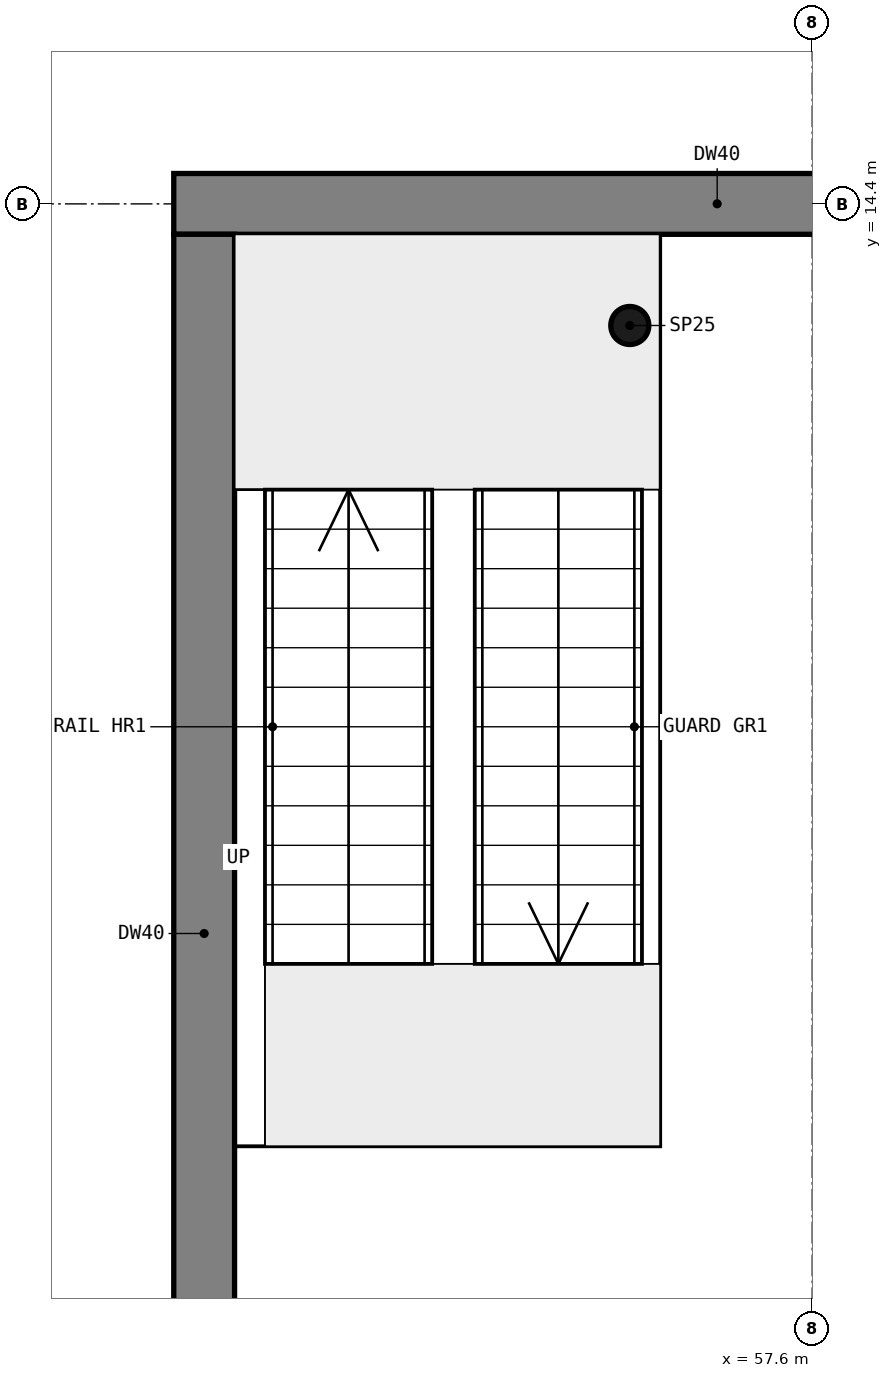
"""IFC4 building model, lengths in metres.
Left out: names, types, materials, properties, quantities, classifications, styles, units other than length and angle.
Written with IfcOpenShell. Run it as: python <this file> out.ifc"""

import sys

from ifc_helpers import new_model, si_unit, direction, frame, frame_2d, origin, origin_2d, place, context, subcontext, project, spatial, rectangle, circle, extrude, element, save


model = new_model("IFC4")
c1 = context("Model", 3, precision=1e-05, world=origin(), true_north=direction((0.0, 1.0)))
c2 = subcontext(c1, "Body", "Model", "MODEL_VIEW")
j1 = project(units=[si_unit("LENGTHUNIT", "METRE"), si_unit("PLANEANGLEUNIT", "RADIAN")], contexts=[c1])
p1 = place(None, origin())
s1 = spatial("IfcSite", under=j1, at=p1, CompositionType="ELEMENT")
p2 = place(p1, origin())
s2 = spatial("IfcBuilding", under=s1, at=p2, CompositionType="ELEMENT")
p3 = place(p2, frame((0.0, 0.0, 8.4)))
s3 = spatial("IfcBuildingStorey", under=s2, at=p3, CompositionType="ELEMENT", Elevation=8.4)
p4 = place(p3, frame((53.4, 14.4, 0.0), z_axis=(0.0, 0.0, 1.0), x_axis=(1.0, 0.0, 0.0)))
e1 = element("IfcWall", 1, at=p4, inside=s3, PredefinedType="SHEAR", context=c2, shape_type="SweptSolid", body=[
    extrude(rectangle(XDim=10.0, YDim=0.4, at=frame_2d((5.0, 0.0))), origin(), (0.0, 0.0, 1.0), 4.5),
])
p5 = place(p4, frame((7.15, 0.0, 1.1)))
e2 = element("IfcOpeningElement", 2, at=p5, cuts=e1, PredefinedType="OPENING", context=c2, shape_type="SweptSolid", body=[
    extrude(rectangle(XDim=1.2, YDim=1.5, at=frame_2d((0.6, 0.75))), frame((0.0, 0.21, 0.0), z_axis=(0.0, -1.0, 0.0), x_axis=(1.0, 0.0, 0.0)), (0.0, 0.0, 1.0), 0.42),
])
p6 = place(p3, frame((53.6, 5.0, 0.0), z_axis=(0.0, 0.0, 1.0), x_axis=(0.0, 1.0, 0.0)))
e3 = element("IfcWall", 3, at=p6, inside=s3, PredefinedType="SHEAR", context=c2, shape_type="SweptSolid", body=[
    extrude(rectangle(XDim=9.2, YDim=0.4, at=frame_2d((4.6, 0.0))), origin(), (0.0, 0.0, 1.0), 4.5),
])
p7 = place(p3, frame((56.4, 13.6, 0.0), z_axis=(0.0, 0.0, 1.0), x_axis=(1.0, 0.0, 0.0)))
e4 = element("IfcColumn", 4, at=p7, inside=s3, PredefinedType="COLUMN", context=c2, shape_type="SweptSolid", body=[
    extrude(circle(Radius=0.125, at=origin_2d()), origin(), (0.0, 0.0, 1.0), 4.5),
])
save(model, sys.argv[1])
